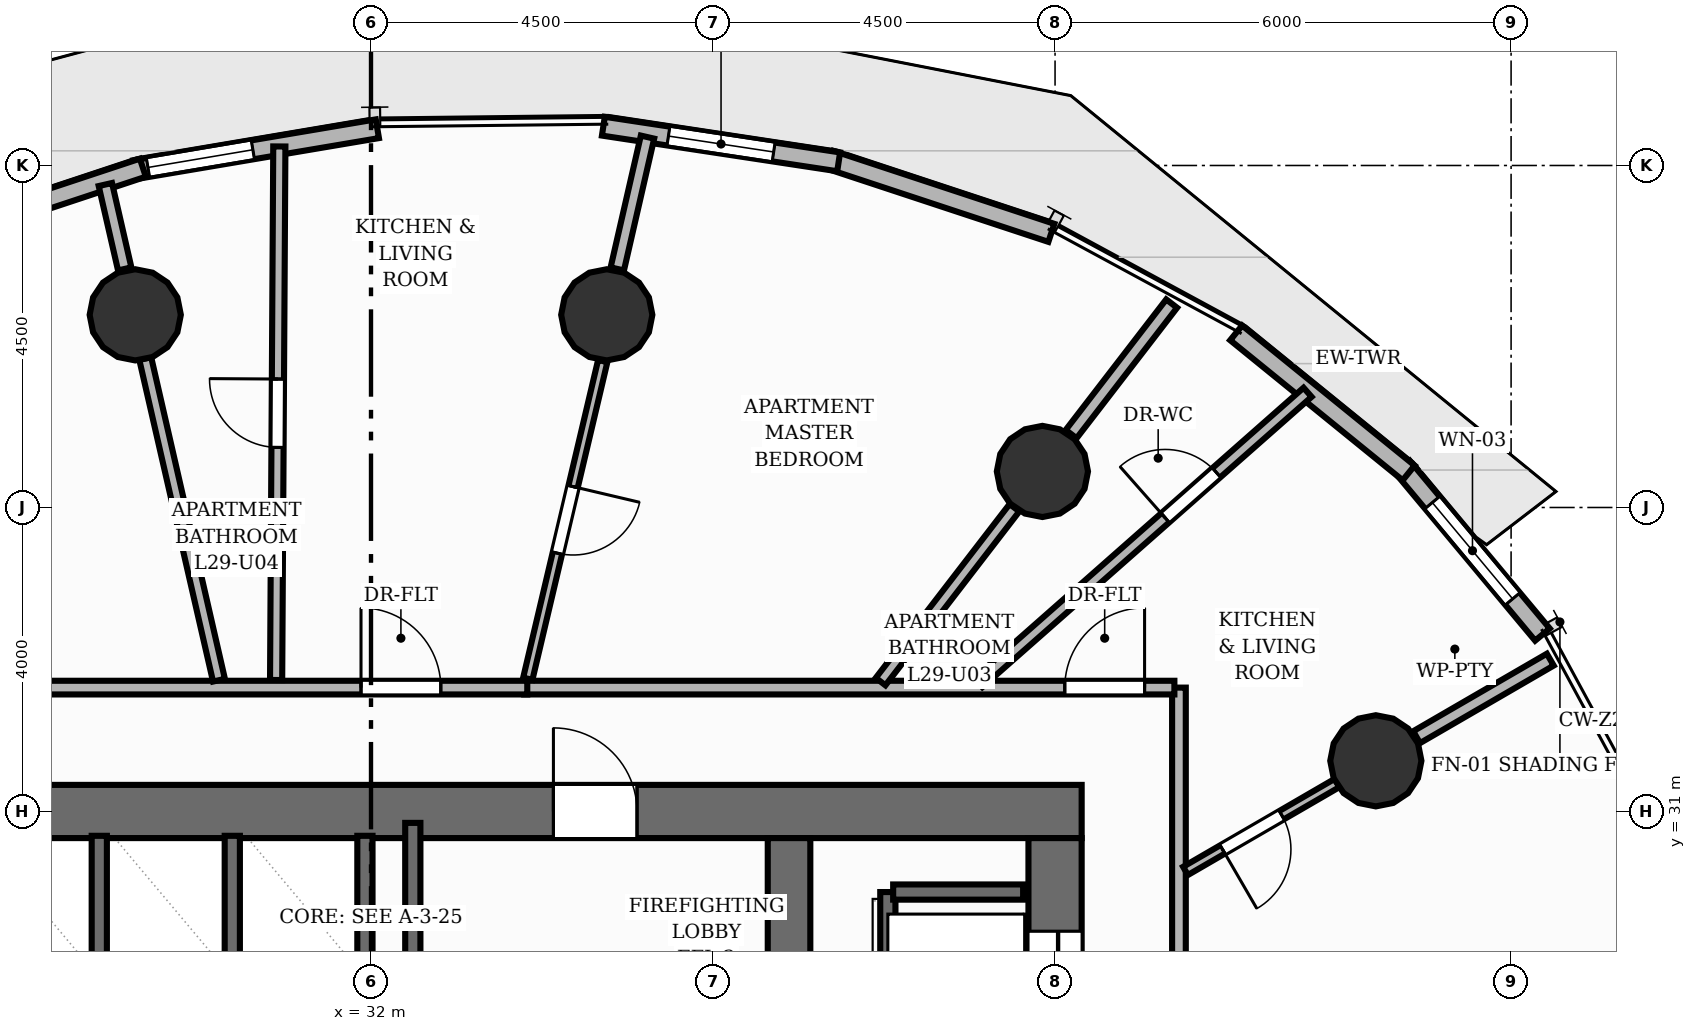
"""IFC4 building model, lengths in metres.
Left out: names, types, materials, properties, quantities, classifications, styles, units other than length and angle.
Written with IfcOpenShell. Run it as: python <this file> out.ifc"""

import sys

from ifc_helpers import new_model, si_unit, direction, frame, frame_2d, origin, origin_2d, place, context, subcontext, project, spatial, rectangle, circle, extrude, element, fill, save


model = new_model("IFC4")
c1 = context("Model", 3, precision=1e-05, world=origin(), true_north=direction((0.0, 1.0)))
c2 = subcontext(c1, "Body", "Model", "MODEL_VIEW")
j1 = project(units=[si_unit("LENGTHUNIT", "METRE"), si_unit("PLANEANGLEUNIT", "RADIAN")], contexts=[c1])
p1 = place(None, origin())
s1 = spatial("IfcSite", under=j1, at=p1, CompositionType="ELEMENT")
p2 = place(p1, origin())
s2 = spatial("IfcBuilding", under=s1, at=p2, CompositionType="ELEMENT")
p3 = place(p2, frame((0.0, 0.0, 99.68)))
s3 = spatial("IfcBuildingStorey", under=s2, at=p3, CompositionType="ELEMENT", Elevation=99.68)
p4 = place(p3, frame((22.65, 31.0, 0.0), z_axis=(0.0, 0.0, 1.0), x_axis=(1.0, 0.0, 0.0)))
e1 = element("IfcWall", 1, at=p4, inside=s3, PredefinedType="SHEAR", context=c2, shape_type="SweptSolid", body=[
    extrude(rectangle(XDim=18.7, YDim=0.7, at=frame_2d((9.35, 0.0))), origin(), (0.0, 0.0, 1.0), 3.2),
])
p5 = place(p4, frame((11.75, 0.0, 0.0)))
e2 = element("IfcOpeningElement", 2, at=p5, cuts=e1, PredefinedType="OPENING", context=c2, shape_type="SweptSolid", body=[
    extrude(rectangle(XDim=1.1, YDim=2.15, at=frame_2d((0.55, 1.075))), frame((0.0, 0.36, 0.0), z_axis=(0.0, -1.0, 0.0), x_axis=(1.0, 0.0, 0.0)), (0.0, 0.0, 1.0), 0.72),
])
p6 = place(p3, frame((41.0, 17.35, 0.0), z_axis=(0.0, 0.0, 1.0), x_axis=(0.0, 1.0, 0.0)))
e3 = element("IfcWall", 3, at=p6, inside=s3, PredefinedType="SHEAR", context=c2, shape_type="SweptSolid", body=[
    extrude(rectangle(XDim=13.3, YDim=0.7, at=frame_2d((6.65, 0.0))), origin(), (0.0, 0.0, 1.0), 3.2),
])
p7 = place(p6, frame((1.225, 0.0, 0.0)))
e4 = element("IfcOpeningElement", 4, at=p7, cuts=e3, PredefinedType="OPENING", context=c2, shape_type="SweptSolid", body=[
    extrude(rectangle(XDim=1.05, YDim=2.15, at=frame_2d((0.525, 1.075))), frame((0.0, 0.36, 0.0), z_axis=(0.0, -1.0, 0.0), x_axis=(1.0, 0.0, 0.0)), (0.0, 0.0, 1.0), 0.72),
])
p8 = place(p6, frame((4.475, 0.0, 0.0)))
e5 = element("IfcOpeningElement", 5, at=p8, cuts=e3, PredefinedType="OPENING", context=c2, shape_type="SweptSolid", body=[
    extrude(rectangle(XDim=1.05, YDim=2.15, at=frame_2d((0.525, 1.075))), frame((0.0, 0.36, 0.0), z_axis=(0.0, -1.0, 0.0), x_axis=(1.0, 0.0, 0.0)), (0.0, 0.0, 1.0), 0.72),
])
p9 = place(p6, frame((7.775, 0.0, 0.0)))
e6 = element("IfcOpeningElement", 6, at=p9, cuts=e3, PredefinedType="OPENING", context=c2, shape_type="SweptSolid", body=[
    extrude(rectangle(XDim=1.05, YDim=2.15, at=frame_2d((0.525, 1.075))), frame((0.0, 0.36, 0.0), z_axis=(0.0, -1.0, 0.0), x_axis=(1.0, 0.0, 0.0)), (0.0, 0.0, 1.0), 0.72),
])
p10 = place(p6, frame((11.025, 0.0, 0.0)))
e7 = element("IfcOpeningElement", 7, at=p10, cuts=e3, PredefinedType="OPENING", context=c2, shape_type="SweptSolid", body=[
    extrude(rectangle(XDim=1.05, YDim=2.15, at=frame_2d((0.525, 1.075))), frame((0.0, 0.36, 0.0), z_axis=(0.0, -1.0, 0.0), x_axis=(1.0, 0.0, 0.0)), (0.0, 0.0, 1.0), 0.72),
])
p11 = place(p3, frame((37.5, 17.35, 0.0), z_axis=(0.0, 0.0, 1.0), x_axis=(0.0, 1.0, 0.0)))
e8 = element("IfcWall", 8, at=p11, inside=s3, PredefinedType="SHEAR", context=c2, shape_type="SweptSolid", body=[
    extrude(rectangle(XDim=13.3, YDim=0.56, at=frame_2d((6.65, 0.0))), origin(), (0.0, 0.0, 1.0), 3.2),
])
for number, where, z_axis, x_axis in (
    (9, (45.22, 31.667, 0.0), (0.0, 0.0, 1.0), (1.0, 0.0, 0.0)),
    (10, (40.833, 35.474, 0.0), (0.0, 0.0, 1.0), (1.0, 0.0, 0.0)),
    (11, (35.102, 37.535, 0.0), (0.0, 0.0, 1.0), (1.0, 0.0, 0.0)),
    (12, (28.898, 37.535, 0.0), (0.0, 0.0, 1.0), (1.0, 0.0, 0.0)),
):
    element("IfcColumn", number, at=place(p3, frame(where, z_axis=z_axis, x_axis=x_axis)), inside=s3, PredefinedType="COLUMN", context=c2, shape_type="SweptSolid", body=[
        extrude(circle(Radius=0.6, at=origin_2d()), origin(), (0.0, 0.0, 1.0), 3.2),
    ])
p12 = place(p3, frame((45.572, 35.535, 0.0), z_axis=(0.0, 0.0, 1.0), x_axis=(0.640518566271, -0.76794268423, 0.0)))
e13 = element("IfcWall", 13, at=p12, inside=s3, PredefinedType="SOLIDWALL", context=c2, shape_type="SweptSolid", body=[
    extrude(rectangle(XDim=2.874, YDim=0.25, at=frame_2d((1.437, 0.0))), origin(), (0.0, 0.0, 1.0), 2.96),
])
p13 = place(p12, frame((0.612, 0.0, 0.85)))
e14 = element("IfcOpeningElement", 14, at=p13, cuts=e13, PredefinedType="OPENING", context=c2, shape_type="SweptSolid", body=[
    extrude(rectangle(XDim=1.65, YDim=1.55, at=frame_2d((0.825, 0.775))), frame((0.0, 0.135, 0.0), z_axis=(0.0, -1.0, 0.0), x_axis=(1.0, 0.0, 0.0)), (0.0, 0.0, 1.0), 0.27),
])
p14 = place(p3, frame((43.383, 37.298, 0.0), z_axis=(0.0, 0.0, 1.0), x_axis=(0.776285131062, -0.630381943976, 0.0)))
e15 = element("IfcWall", 15, at=p14, inside=s3, PredefinedType="SOLIDWALL", context=c2, shape_type="SweptSolid", body=[
    extrude(rectangle(XDim=2.923, YDim=0.25, at=frame_2d((1.462, 0.0))), origin(), (0.0, 0.0, 1.0), 2.96),
])
p15 = place(p3, frame((38.045, 39.574, 0.0), z_axis=(0.0, 0.0, 1.0), x_axis=(0.949533409058, -0.313665913166, 0.0)))
e16 = element("IfcWall", 16, at=p15, inside=s3, PredefinedType="SOLIDWALL", context=c2, shape_type="SweptSolid", body=[
    extrude(rectangle(XDim=3.061, YDim=0.25, at=frame_2d((1.53, 0.0))), origin(), (0.0, 0.0, 1.0), 2.96),
])
p16 = place(p3, frame((35.057, 40.017, 0.0), z_axis=(0.0, 0.0, 1.0), x_axis=(0.988719703222, -0.149777663425, 0.0)))
e17 = element("IfcWall", 17, at=p16, inside=s3, PredefinedType="SOLIDWALL", context=c2, shape_type="SweptSolid", body=[
    extrude(rectangle(XDim=3.131, YDim=0.25, at=frame_2d((1.566, 0.0))), origin(), (0.0, 0.0, 1.0), 2.96),
])
p17 = place(p16, frame((0.866, 0.0, 0.85)))
e18 = element("IfcOpeningElement", 18, at=p17, cuts=e17, PredefinedType="OPENING", context=c2, shape_type="SweptSolid", body=[
    extrude(rectangle(XDim=1.4, YDim=1.37, at=frame_2d((0.7, 0.685))), frame((0.0, 0.135, 0.0), z_axis=(0.0, -1.0, 0.0), x_axis=(1.0, 0.0, 0.0)), (0.0, 0.0, 1.0), 0.27),
])
p18 = place(p3, frame((28.893, 39.445, 0.0), z_axis=(0.0, 0.0, 1.0), x_axis=(0.986043062305, 0.166490478044, 0.0)))
e19 = element("IfcWall", 19, at=p18, inside=s3, PredefinedType="SOLIDWALL", context=c2, shape_type="SweptSolid", body=[
    extrude(rectangle(XDim=3.236, YDim=0.25, at=frame_2d((1.618, 0.0))), origin(), (0.0, 0.0, 1.0), 2.96),
])
p19 = place(p18, frame((0.175, 0.0, 0.85)))
e20 = element("IfcOpeningElement", 20, at=p19, cuts=e19, PredefinedType="OPENING", context=c2, shape_type="SweptSolid", body=[
    extrude(rectangle(XDim=1.4, YDim=1.55, at=frame_2d((0.7, 0.775))), frame((0.0, 0.135, 0.0), z_axis=(0.0, -1.0, 0.0), x_axis=(1.0, 0.0, 0.0)), (0.0, 0.0, 1.0), 0.27),
])
p20 = place(p3, frame((25.904, 38.445, 0.0), z_axis=(0.0, 0.0, 1.0), x_axis=(0.949206293356, 0.314654433709, 0.0)))
e21 = element("IfcWall", 21, at=p20, inside=s3, PredefinedType="SOLIDWALL", context=c2, shape_type="SweptSolid", body=[
    extrude(rectangle(XDim=3.26, YDim=0.25, at=frame_2d((1.63, 0.0))), origin(), (0.0, 0.0, 1.0), 2.96),
])
p21 = place(p3, frame((32.55, 27.35, 0.0), z_axis=(0.0, 0.0, 1.0), x_axis=(0.0, 1.0, 0.0)))
e22 = element("IfcWall", 22, at=p21, inside=s3, PredefinedType="SHEAR", context=c2, shape_type="SweptSolid", body=[
    extrude(rectangle(XDim=3.5, YDim=0.2, at=frame_2d((1.75, 0.0))), origin(), (0.0, 0.0, 1.0), 3.2),
])
p22 = place(p3, frame((38.8, 18.06, 0.0), z_axis=(0.0, 0.0, 1.0), x_axis=(0.0, 1.0, 0.0)))
e23 = element("IfcWall", 23, at=p22, inside=s3, PredefinedType="SHEAR", context=c2, shape_type="SweptSolid", body=[
    extrude(rectangle(XDim=11.88, YDim=0.2, at=frame_2d((5.94, 0.0))), origin(), (0.0, 0.0, 1.0), 3.2),
])
p23 = place(p3, frame((38.87, 29.94, 0.0), z_axis=(0.0, 0.0, 1.0), x_axis=(1.0, 0.0, 0.0)))
e24 = element("IfcWall", 24, at=p23, inside=s3, PredefinedType="SHEAR", context=c2, shape_type="SweptSolid", body=[
    extrude(rectangle(XDim=1.71, YDim=0.2, at=frame_2d((0.855, 0.0))), origin(), (0.0, 0.0, 1.0), 3.2),
])
for number, where, z_axis, x_axis in (
    (25, (31.92, 29.02, 0.0), (0.0, 0.0, 1.0), (0.0, 1.0, 0.0)),
    (26, (28.425, 29.02, 0.0), (0.0, 0.0, 1.0), (0.0, 1.0, 0.0)),
    (27, (30.175, 29.02, 0.0), (0.0, 0.0, 1.0), (0.0, 1.0, 0.0)),
):
    element("IfcWall", number, at=place(p3, frame(where, z_axis=z_axis, x_axis=x_axis)), inside=s3, PredefinedType="SHEAR", context=c2, shape_type="SweptSolid", body=[
        extrude(rectangle(XDim=1.66, YDim=0.2, at=frame_2d((0.83, 0.0))), origin(), (0.0, 0.0, 1.0), 3.2),
    ])
p24 = place(p3, frame((45.757, 31.978, 0.0), z_axis=(0.0, 0.0, 1.0), x_axis=(0.865025978628, 0.501727073516, 0.0)))
e28 = element("IfcWall", 28, at=p24, inside=s3, PredefinedType="PARTITIONING", context=c2, shape_type="SweptSolid", body=[
    extrude(rectangle(XDim=2.033, YDim=0.18, at=frame_2d((1.017, 0.0))), origin(), (0.0, 0.0, 1.0), 2.261),
])
p25 = place(p3, frame((41.212, 35.966, 0.0), z_axis=(0.0, 0.0, 1.0), x_axis=(0.610026423006, 0.792381071981, 0.0)))
e29 = element("IfcWall", 29, at=p25, inside=s3, PredefinedType="PARTITIONING", context=c2, shape_type="SweptSolid", body=[
    extrude(rectangle(XDim=2.167, YDim=0.18, at=frame_2d((1.084, 0.0))), origin(), (0.0, 0.0, 1.0), 2.261),
])
p26 = place(p3, frame((35.24, 38.139, 0.0), z_axis=(0.0, 0.0, 1.0), x_axis=(0.223406034992, 0.974725470853, 0.0)))
e30 = element("IfcWall", 30, at=p26, inside=s3, PredefinedType="PARTITIONING", context=c2, shape_type="SweptSolid", body=[
    extrude(rectangle(XDim=1.779, YDim=0.18, at=frame_2d((0.89, 0.0))), origin(), (0.0, 0.0, 1.0), 2.261),
])
p27 = place(p3, frame((28.76, 38.139, 0.0), z_axis=(0.0, 0.0, 1.0), x_axis=(-0.223325248633, 0.974743983476, 0.0)))
e31 = element("IfcWall", 31, at=p27, inside=s3, PredefinedType="PARTITIONING", context=c2, shape_type="SweptSolid", body=[
    extrude(rectangle(XDim=1.139, YDim=0.18, at=frame_2d((0.57, 0.0))), origin(), (0.0, 0.0, 1.0), 2.261),
])
p28 = place(p3, frame((42.63, 32.63, 0.0), z_axis=(0.0, 0.0, 1.0), x_axis=(0.0, -1.0, 0.0)))
e32 = element("IfcWall", 32, at=p28, inside=s3, PredefinedType="PARTITIONING", context=c2, shape_type="SweptSolid", body=[
    extrude(rectangle(XDim=6.23, YDim=0.18, at=frame_2d((3.115, 0.0))), origin(), (0.0, 0.0, 1.0), 2.955),
])
p29 = place(p3, frame((34.015, 32.63, 0.0), z_axis=(0.0, 0.0, 1.0), x_axis=(1.0, 0.0, 0.0)))
e33 = element("IfcWall", 33, at=p29, inside=s3, PredefinedType="PARTITIONING", context=c2, shape_type="SweptSolid", body=[
    extrude(rectangle(XDim=8.555, YDim=0.18, at=frame_2d((4.277, 0.0))), origin(), (0.0, 0.0, 1.0), 2.955),
])
p30 = place(p29, frame((7.112, 0.0, 0.0)))
e34 = element("IfcOpeningElement", 34, at=p30, cuts=e33, PredefinedType="OPENING", context=c2, shape_type="SweptSolid", body=[
    extrude(rectangle(XDim=1.05, YDim=2.15, at=frame_2d((0.525, 1.075))), frame((0.0, 0.1, 0.0), z_axis=(0.0, -1.0, 0.0), x_axis=(1.0, 0.0, 0.0)), (0.0, 0.0, 1.0), 0.2),
])
p31 = place(p3, frame((21.37, 32.63, 0.0), z_axis=(0.0, 0.0, 1.0), x_axis=(1.0, 0.0, 0.0)))
e35 = element("IfcWall", 35, at=p31, inside=s3, PredefinedType="PARTITIONING", context=c2, shape_type="SweptSolid", body=[
    extrude(rectangle(XDim=12.686, YDim=0.18, at=frame_2d((6.343, 0.0))), origin(), (0.0, 0.0, 1.0), 2.955),
])
p32 = place(p31, frame((10.499, 0.0, 0.0)))
e36 = element("IfcOpeningElement", 36, at=p32, cuts=e35, PredefinedType="OPENING", context=c2, shape_type="SweptSolid", body=[
    extrude(rectangle(XDim=1.05, YDim=2.15, at=frame_2d((0.525, 1.075))), frame((0.0, 0.1, 0.0), z_axis=(0.0, -1.0, 0.0), x_axis=(1.0, 0.0, 0.0)), (0.0, 0.0, 1.0), 0.2),
])
p33 = place(p31, frame((4.713, 0.0, 0.0)))
e37 = element("IfcOpeningElement", 37, at=p33, cuts=e35, PredefinedType="OPENING", context=c2, shape_type="SweptSolid", body=[
    extrude(rectangle(XDim=1.05, YDim=2.15, at=frame_2d((0.525, 1.075))), frame((0.0, 0.1, 0.0), z_axis=(0.0, -1.0, 0.0), x_axis=(1.0, 0.0, 0.0)), (0.0, 0.0, 1.0), 0.2),
])
p34 = place(p3, frame((39.991, 32.696, 0.0), z_axis=(0.0, 0.0, 1.0), x_axis=(0.750059872717, 0.661369932292, 0.0)))
e38 = element("IfcWall", 38, at=p34, inside=s3, PredefinedType="PLUMBINGWALL", context=c2, shape_type="SweptSolid", body=[
    extrude(rectangle(XDim=5.775, YDim=0.16, at=frame_2d((2.888, 0.0))), origin(), (0.0, 0.0, 1.0), 2.955),
])
p35 = place(p34, frame((3.278, 0.0, 0.0)))
e39 = element("IfcOpeningElement", 39, at=p35, cuts=e38, PredefinedType="OPENING", context=c2, shape_type="SweptSolid", body=[
    extrude(rectangle(XDim=0.9, YDim=2.1, at=frame_2d((0.45, 1.05))), frame((0.0, 0.09, 0.0), z_axis=(0.0, -1.0, 0.0), x_axis=(1.0, 0.0, 0.0)), (0.0, 0.0, 1.0), 0.18),
])
p36 = place(p3, frame((44.711, 31.375, 0.0), z_axis=(0.0, 0.0, 1.0), x_axis=(-0.864966854608, -0.501828995207, 0.0)))
e40 = element("IfcWall", 40, at=p36, inside=s3, PredefinedType="PARTITIONING", context=c2, shape_type="SweptSolid", body=[
    extrude(rectangle(XDim=2.306, YDim=0.125, at=frame_2d((1.153, 0.0))), origin(), (0.0, 0.0, 1.0), 2.261),
])
p37 = place(p36, frame((0.843, 0.0, 0.0)))
e41 = element("IfcOpeningElement", 41, at=p37, cuts=e40, PredefinedType="OPENING", context=c2, shape_type="SweptSolid", body=[
    extrude(rectangle(XDim=0.9, YDim=2.1, at=frame_2d((0.45, 1.05))), frame((0.0, 0.073, 0.0), z_axis=(0.0, -1.0, 0.0), x_axis=(1.0, 0.0, 0.0)), (0.0, 0.0, 1.0), 0.145),
])
p38 = place(p3, frame((38.705, 32.709, 0.0), z_axis=(0.0, 0.0, 1.0), x_axis=(0.610033601295, 0.792375545617, 0.0)))
e42 = element("IfcWall", 42, at=p38, inside=s3, PredefinedType="PLUMBINGWALL", context=c2, shape_type="SweptSolid", body=[
    extrude(rectangle(XDim=2.887, YDim=0.16, at=frame_2d((1.443, 0.0))), origin(), (0.0, 0.0, 1.0), 2.261),
])
p39 = place(p3, frame((30.752, 32.73, 0.0), z_axis=(0.0, 0.0, 1.0), x_axis=(0.006016026892, 0.999981903546, 0.0)))
e43 = element("IfcWall", 43, at=p39, inside=s3, PredefinedType="PLUMBINGWALL", context=c2, shape_type="SweptSolid", body=[
    extrude(rectangle(XDim=7.021, YDim=0.16, at=frame_2d((3.51, 0.0))), origin(), (0.0, 0.0, 1.0), 2.955),
])
p40 = place(p39, frame((3.06, 0.0, 0.0)))
e44 = element("IfcOpeningElement", 44, at=p40, cuts=e43, PredefinedType="OPENING", context=c2, shape_type="SweptSolid", body=[
    extrude(rectangle(XDim=0.9, YDim=2.1, at=frame_2d((0.45, 1.05))), frame((0.0, 0.09, 0.0), z_axis=(0.0, -1.0, 0.0), x_axis=(1.0, 0.0, 0.0)), (0.0, 0.0, 1.0), 0.18),
])
p41 = place(p3, frame((35.049, 36.927, 0.0), z_axis=(0.0, 0.0, 1.0), x_axis=(-0.229552612231, -0.973296254086, 0.0)))
e45 = element("IfcWall", 45, at=p41, inside=s3, PredefinedType="PARTITIONING", context=c2, shape_type="SweptSolid", body=[
    extrude(rectangle(XDim=4.295, YDim=0.125, at=frame_2d((2.147, 0.0))), origin(), (0.0, 0.0, 1.0), 2.261),
])
p42 = place(p41, frame((1.698, 0.0, 0.0)))
e46 = element("IfcOpeningElement", 46, at=p42, cuts=e45, PredefinedType="OPENING", context=c2, shape_type="SweptSolid", body=[
    extrude(rectangle(XDim=0.9, YDim=2.1, at=frame_2d((0.45, 1.05))), frame((0.0, 0.073, 0.0), z_axis=(0.0, -1.0, 0.0), x_axis=(1.0, 0.0, 0.0)), (0.0, 0.0, 1.0), 0.145),
])
p43 = place(p3, frame((30.0, 32.728, 0.0), z_axis=(0.0, 0.0, 1.0), x_axis=(-0.223409547543, 0.974724665773, 0.0)))
e47 = element("IfcWall", 47, at=p43, inside=s3, PredefinedType="PLUMBINGWALL", context=c2, shape_type="SweptSolid", body=[
    extrude(rectangle(XDim=4.342, YDim=0.16, at=frame_2d((2.171, 0.0))), origin(), (0.0, 0.0, 1.0), 2.261),
])
p44 = place(p13, origin())
e48 = element("IfcWindow", 48, at=p44, inside=s3, PartitioningType="SINGLE_PANEL", PredefinedType="WINDOW", context=c2, shape_type="SweptSolid", body=[
    extrude(rectangle(XDim=1.65, YDim=1.55, at=frame_2d((0.825, 0.775))), frame((0.0, 0.03, 0.0), z_axis=(0.0, -1.0, 0.0), x_axis=(1.0, 0.0, 0.0)), (0.0, 0.0, 1.0), 0.06),
])
fill(e14, e48)
p45 = place(p17, origin())
e49 = element("IfcWindow", 49, at=p45, inside=s3, PartitioningType="SINGLE_PANEL", PredefinedType="WINDOW", context=c2, shape_type="SweptSolid", body=[
    extrude(rectangle(XDim=1.4, YDim=1.37, at=frame_2d((0.7, 0.685))), frame((0.0, 0.03, 0.0), z_axis=(0.0, -1.0, 0.0), x_axis=(1.0, 0.0, 0.0)), (0.0, 0.0, 1.0), 0.06),
])
fill(e18, e49)
p46 = place(p19, origin())
e50 = element("IfcWindow", 50, at=p46, inside=s3, PartitioningType="SINGLE_PANEL", PredefinedType="WINDOW", context=c2, shape_type="SweptSolid", body=[
    extrude(rectangle(XDim=1.4, YDim=1.55, at=frame_2d((0.7, 0.775))), frame((0.0, 0.03, 0.0), z_axis=(0.0, -1.0, 0.0), x_axis=(1.0, 0.0, 0.0)), (0.0, 0.0, 1.0), 0.06),
])
fill(e20, e50)
p47 = place(p5, origin())
e51 = element("IfcDoor", 51, at=p47, inside=s3, OperationType="SINGLE_SWING_LEFT", PredefinedType="DOOR", context=c2, shape_type="SweptSolid", body=[
    extrude(rectangle(XDim=1.1, YDim=2.15, at=frame_2d((0.55, 1.075))), frame((0.0, 0.025, 0.0), z_axis=(0.0, -1.0, 0.0), x_axis=(1.0, 0.0, 0.0)), (0.0, 0.0, 1.0), 0.05),
])
fill(e2, e51)
p48 = place(p10, origin())
e52 = element("IfcDoor", 52, at=p48, inside=s3, OperationType="DOUBLE_DOOR_SLIDING", PredefinedType="DOOR", context=c2, shape_type="SweptSolid", body=[
    extrude(rectangle(XDim=1.05, YDim=2.15, at=frame_2d((0.525, 1.075))), frame((0.0, 0.025, 0.0), z_axis=(0.0, -1.0, 0.0), x_axis=(1.0, 0.0, 0.0)), (0.0, 0.0, 1.0), 0.05),
])
fill(e7, e52)
p49 = place(p30, origin())
e53 = element("IfcDoor", 53, at=p49, inside=s3, OperationType="SINGLE_SWING_RIGHT", PredefinedType="DOOR", context=c2, shape_type="SweptSolid", body=[
    extrude(rectangle(XDim=1.05, YDim=2.15, at=frame_2d((0.525, 1.075))), frame((0.0, 0.025, 0.0), z_axis=(0.0, -1.0, 0.0), x_axis=(1.0, 0.0, 0.0)), (0.0, 0.0, 1.0), 0.05),
])
fill(e34, e53)
p50 = place(p35, origin())
e54 = element("IfcDoor", 54, at=p50, inside=s3, OperationType="SINGLE_SWING_LEFT", PredefinedType="DOOR", context=c2, shape_type="SweptSolid", body=[
    extrude(rectangle(XDim=0.9, YDim=2.1, at=frame_2d((0.45, 1.05))), frame((0.0, 0.025, 0.0), z_axis=(0.0, -1.0, 0.0), x_axis=(1.0, 0.0, 0.0)), (0.0, 0.0, 1.0), 0.05),
])
fill(e39, e54)
p51 = place(p37, origin())
e55 = element("IfcDoor", 55, at=p51, inside=s3, OperationType="SINGLE_SWING_RIGHT", PredefinedType="DOOR", context=c2, shape_type="SweptSolid", body=[
    extrude(rectangle(XDim=0.9, YDim=2.1, at=frame_2d((0.45, 1.05))), frame((0.0, 0.025, 0.0), z_axis=(0.0, -1.0, 0.0), x_axis=(1.0, 0.0, 0.0)), (0.0, 0.0, 1.0), 0.05),
])
fill(e41, e55)
p52 = place(p32, origin())
e56 = element("IfcDoor", 56, at=p52, inside=s3, OperationType="SINGLE_SWING_LEFT", PredefinedType="DOOR", context=c2, shape_type="SweptSolid", body=[
    extrude(rectangle(XDim=1.05, YDim=2.15, at=frame_2d((0.525, 1.075))), frame((0.0, 0.025, 0.0), z_axis=(0.0, -1.0, 0.0), x_axis=(1.0, 0.0, 0.0)), (0.0, 0.0, 1.0), 0.05),
])
fill(e36, e56)
p53 = place(p40, origin())
e57 = element("IfcDoor", 57, at=p53, inside=s3, OperationType="SINGLE_SWING_RIGHT", PredefinedType="DOOR", context=c2, shape_type="SweptSolid", body=[
    extrude(rectangle(XDim=0.9, YDim=2.1, at=frame_2d((0.45, 1.05))), frame((0.0, 0.025, 0.0), z_axis=(0.0, -1.0, 0.0), x_axis=(1.0, 0.0, 0.0)), (0.0, 0.0, 1.0), 0.05),
])
fill(e44, e57)
p54 = place(p42, origin())
e58 = element("IfcDoor", 58, at=p54, inside=s3, OperationType="SINGLE_SWING_LEFT", PredefinedType="DOOR", context=c2, shape_type="SweptSolid", body=[
    extrude(rectangle(XDim=0.9, YDim=2.1, at=frame_2d((0.45, 1.05))), frame((0.0, 0.025, 0.0), z_axis=(0.0, -1.0, 0.0), x_axis=(1.0, 0.0, 0.0)), (0.0, 0.0, 1.0), 0.05),
])
fill(e46, e58)
save(model, sys.argv[1])
